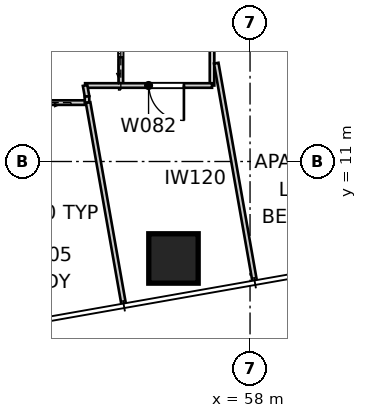
"""IFC4 building model, lengths in metres.
Left out: names, types, materials, properties, quantities, classifications, styles, units other than length and angle.
Written with IfcOpenShell. Run it as: python <this file> out.ifc"""

import sys

from ifc_helpers import new_model, si_unit, direction, frame, frame_2d, origin, origin_2d, place, context, subcontext, project, spatial, rectangle, extrude, element, fill, save


model = new_model("IFC4")
c1 = context("Model", 3, precision=1e-05, world=origin(), true_north=direction((0.0, 1.0)))
c2 = subcontext(c1, "Body", "Model", "MODEL_VIEW")
j1 = project(units=[si_unit("LENGTHUNIT", "METRE"), si_unit("PLANEANGLEUNIT", "RADIAN")], contexts=[c1])
p1 = place(None, origin())
s1 = spatial("IfcSite", under=j1, at=p1, CompositionType="ELEMENT")
p2 = place(p1, origin())
s2 = spatial("IfcBuilding", under=s1, at=p2, CompositionType="ELEMENT")
p3 = place(p2, frame((0.0, 0.0, 86.2)))
s3 = spatial("IfcBuildingStorey", under=s2, at=p3, CompositionType="ELEMENT", Elevation=86.2)
p4 = place(p3, frame((55.985, 8.448, 0.0), z_axis=(0.0, 0.0, 1.0), x_axis=(1.0, 0.0, 0.0)))
e1 = element("IfcColumn", 1, at=p4, inside=s3, PredefinedType="COLUMN", context=c2, shape_type="SweptSolid", body=[
    extrude(rectangle(XDim=1.3, YDim=1.3, at=origin_2d()), origin(), (0.0, 0.0, 1.0), 3.4),
])
p5 = place(p3, frame((54.6, 13.0, 0.0), z_axis=(0.0, 0.0, 1.0), x_axis=(0.0, 1.0, 0.0)))
e2 = element("IfcWall", 2, at=p5, inside=s3, PredefinedType="PARTITIONING", context=c2, shape_type="SweptSolid", body=[
    extrude(rectangle(XDim=2.45, YDim=0.12, at=frame_2d((1.225, 0.0))), origin(), (0.0, 0.0, 1.0), 3.25),
])
p6 = place(p5, frame((0.745, 0.0, 0.0)))
e3 = element("IfcOpeningElement", 3, at=p6, cuts=e2, PredefinedType="OPENING", context=c2, shape_type="SweptSolid", body=[
    extrude(rectangle(XDim=0.96, YDim=2.1, at=frame_2d((0.48, 1.05))), frame((0.0, 0.07, 0.0), z_axis=(0.0, -1.0, 0.0), x_axis=(1.0, 0.0, 0.0)), (0.0, 0.0, 1.0), 0.14),
])
p7 = place(p3, frame((57.0, 47.0, 0.0), z_axis=(0.0, 0.0, 1.0), x_axis=(0.0, -1.0, 0.0)))
e4 = element("IfcWall", 4, at=p7, inside=s3, PredefinedType="PARTITIONING", context=c2, shape_type="SweptSolid", body=[
    extrude(rectangle(XDim=34.0, YDim=0.12, at=frame_2d((17.0, 0.0))), origin(), (0.0, 0.0, 1.0), 2.55),
])
p8 = place(p7, frame((8.361, 0.0, 0.0)))
e5 = element("IfcOpeningElement", 5, at=p8, cuts=e4, PredefinedType="OPENING", context=c2, shape_type="SweptSolid", body=[
    extrude(rectangle(XDim=0.92, YDim=2.34, at=frame_2d((0.46, 1.17))), frame((0.0, 0.07, 0.0), z_axis=(0.0, -1.0, 0.0), x_axis=(1.0, 0.0, 0.0)), (0.0, 0.0, 1.0), 0.14),
])
p9 = place(p7, frame((11.166, 0.0, 0.0)))
e6 = element("IfcOpeningElement", 6, at=p9, cuts=e4, PredefinedType="OPENING", context=c2, shape_type="SweptSolid", body=[
    extrude(rectangle(XDim=0.92, YDim=2.34, at=frame_2d((0.46, 1.17))), frame((0.0, 0.07, 0.0), z_axis=(0.0, -1.0, 0.0), x_axis=(1.0, 0.0, 0.0)), (0.0, 0.0, 1.0), 0.14),
])
p10 = place(p7, frame((4.683, 0.0, 0.0)))
e7 = element("IfcOpeningElement", 7, at=p10, cuts=e4, PredefinedType="OPENING", context=c2, shape_type="SweptSolid", body=[
    extrude(rectangle(XDim=0.92, YDim=2.34, at=frame_2d((0.46, 1.17))), frame((0.0, 0.07, 0.0), z_axis=(0.0, -1.0, 0.0), x_axis=(1.0, 0.0, 0.0)), (0.0, 0.0, 1.0), 0.14),
])
p11 = place(p7, frame((27.784, 0.0, 0.0)))
e8 = element("IfcOpeningElement", 8, at=p11, cuts=e4, PredefinedType="OPENING", context=c2, shape_type="SweptSolid", body=[
    extrude(rectangle(XDim=0.92, YDim=2.34, at=frame_2d((0.46, 1.17))), frame((0.0, 0.07, 0.0), z_axis=(0.0, -1.0, 0.0), x_axis=(1.0, 0.0, 0.0)), (0.0, 0.0, 1.0), 0.14),
])
p12 = place(p7, frame((31.939, 0.0, 0.0)))
e9 = element("IfcOpeningElement", 9, at=p12, cuts=e4, PredefinedType="OPENING", context=c2, shape_type="SweptSolid", body=[
    extrude(rectangle(XDim=0.92, YDim=2.34, at=frame_2d((0.46, 1.17))), frame((0.0, 0.07, 0.0), z_axis=(0.0, -1.0, 0.0), x_axis=(1.0, 0.0, 0.0)), (0.0, 0.0, 1.0), 0.14),
])
p13 = place(p7, frame((15.601, 0.0, 0.0)))
e10 = element("IfcOpeningElement", 10, at=p13, cuts=e4, PredefinedType="OPENING", context=c2, shape_type="SweptSolid", body=[
    extrude(rectangle(XDim=0.96, YDim=2.1, at=frame_2d((0.48, 1.05))), frame((0.0, 0.07, 0.0), z_axis=(0.0, -1.0, 0.0), x_axis=(1.0, 0.0, 0.0)), (0.0, 0.0, 1.0), 0.14),
])
p14 = place(p7, frame((18.21, 0.0, 0.0)))
e11 = element("IfcOpeningElement", 11, at=p14, cuts=e4, PredefinedType="OPENING", context=c2, shape_type="SweptSolid", body=[
    extrude(rectangle(XDim=0.96, YDim=2.1, at=frame_2d((0.48, 1.05))), frame((0.0, 0.07, 0.0), z_axis=(0.0, -1.0, 0.0), x_axis=(1.0, 0.0, 0.0)), (0.0, 0.0, 1.0), 0.14),
])
p15 = place(p7, frame((1.19, 0.0, 0.0)))
e12 = element("IfcOpeningElement", 12, at=p15, cuts=e4, PredefinedType="OPENING", context=c2, shape_type="SweptSolid", body=[
    extrude(rectangle(XDim=0.96, YDim=2.1, at=frame_2d((0.48, 1.05))), frame((0.0, 0.07, 0.0), z_axis=(0.0, -1.0, 0.0), x_axis=(1.0, 0.0, 0.0)), (0.0, 0.0, 1.0), 0.14),
])
p16 = place(p3, frame((57.0, 13.0, 0.0), z_axis=(0.0, 0.0, 1.0), x_axis=(-1.0, 0.0, 0.0)))
e13 = element("IfcWall", 13, at=p16, inside=s3, PredefinedType="PARTITIONING", context=c2, shape_type="SweptSolid", body=[
    extrude(rectangle(XDim=3.34, YDim=0.12, at=frame_2d((1.67, 0.0))), origin(), (0.0, 0.0, 1.0), 3.25),
])
p17 = place(p16, frame((0.74, 0.0, 0.0)))
e14 = element("IfcOpeningElement", 14, at=p17, cuts=e13, PredefinedType="OPENING", context=c2, shape_type="SweptSolid", body=[
    extrude(rectangle(XDim=0.92, YDim=2.34, at=frame_2d((0.46, 1.17))), frame((0.0, 0.07, 0.0), z_axis=(0.0, -1.0, 0.0), x_axis=(1.0, 0.0, 0.0)), (0.0, 0.0, 1.0), 0.14),
])
p18 = place(p3, frame((53.71, 12.55, 0.0), z_axis=(0.0, 0.0, 1.0), x_axis=(-1.0, 0.0, 0.0)))
e15 = element("IfcWall", 15, at=p18, inside=s3, PredefinedType="PARTITIONING", context=c2, shape_type="SweptSolid", body=[
    extrude(rectangle(XDim=3.525, YDim=0.12, at=frame_2d((1.763, 0.0))), origin(), (0.0, 0.0, 1.0), 3.25),
])
p19 = place(p18, frame((1.283, 0.0, 0.0)))
e16 = element("IfcOpeningElement", 16, at=p19, cuts=e15, PredefinedType="OPENING", context=c2, shape_type="SweptSolid", body=[
    extrude(rectangle(XDim=0.96, YDim=2.1, at=frame_2d((0.48, 1.05))), frame((0.0, 0.07, 0.0), z_axis=(0.0, -1.0, 0.0), x_axis=(1.0, 0.0, 0.0)), (0.0, 0.0, 1.0), 0.14),
])
p20 = place(p3, frame((53.66, 13.0, 0.0), z_axis=(0.0, 0.0, 1.0), x_axis=(0.172927442902, -0.984934566096, 0.0)))
e17 = element("IfcWall", 17, at=p20, inside=s3, PredefinedType="PARTITIONING", context=c2, shape_type="SweptSolid", body=[
    extrude(rectangle(XDim=0.292, YDim=0.12, at=frame_2d((0.146, 0.0))), origin(), (0.0, 0.0, 1.0), 3.25),
])
p21 = place(p3, frame((58.122, 7.85, 0.0), z_axis=(0.0, 0.0, 1.0), x_axis=(-0.173634707655, 0.984810128044, 0.0)))
e18 = element("IfcWall", 18, at=p21, inside=s3, PredefinedType="PARTITIONING", context=c2, shape_type="SweptSolid", body=[
    extrude(rectangle(XDim=5.825, YDim=0.12, at=frame_2d((2.913, 0.0))), origin(), (0.0, 0.0, 1.0), 2.638),
])
p22 = place(p3, frame((53.739, 12.55, 0.0), z_axis=(0.0, 0.0, 1.0), x_axis=(0.173632864151, -0.984810453076, 0.0)))
e19 = element("IfcWall", 19, at=p22, inside=s3, PredefinedType="PARTITIONING", context=c2, shape_type="SweptSolid", body=[
    extrude(rectangle(XDim=5.389, YDim=0.12, at=frame_2d((2.695, 0.0))), origin(), (0.0, 0.0, 1.0), 3.25),
])
p23 = place(p3, frame((53.71, 12.712, 0.0), z_axis=(0.0, 0.0, 1.0), x_axis=(0.0, -1.0, 0.0)))
e20 = element("IfcWall", 20, at=p23, inside=s3, PredefinedType="PARTITIONING", context=c2, shape_type="SweptSolid", body=[
    extrude(rectangle(XDim=0.162, YDim=0.12, at=frame_2d((0.081, 0.0))), origin(), (0.0, 0.0, 1.0), 3.25),
])
p24 = place(p6, origin())
e21 = element("IfcDoor", 21, at=p24, inside=s3, OperationType="SLIDING_TO_LEFT", PredefinedType="DOOR", context=c2, shape_type="SweptSolid", body=[
    extrude(rectangle(XDim=0.96, YDim=2.1, at=frame_2d((0.48, 1.05))), frame((0.0, 0.025, 0.0), z_axis=(0.0, -1.0, 0.0), x_axis=(1.0, 0.0, 0.0)), (0.0, 0.0, 1.0), 0.05),
])
fill(e3, e21)
p25 = place(p17, origin())
e22 = element("IfcDoor", 22, at=p25, inside=s3, OperationType="SINGLE_SWING_LEFT", PredefinedType="DOOR", context=c2, shape_type="SweptSolid", body=[
    extrude(rectangle(XDim=0.92, YDim=2.34, at=frame_2d((0.46, 1.17))), frame((0.0, 0.025, 0.0), z_axis=(0.0, -1.0, 0.0), x_axis=(1.0, 0.0, 0.0)), (0.0, 0.0, 1.0), 0.05),
])
fill(e14, e22)
save(model, sys.argv[1])
